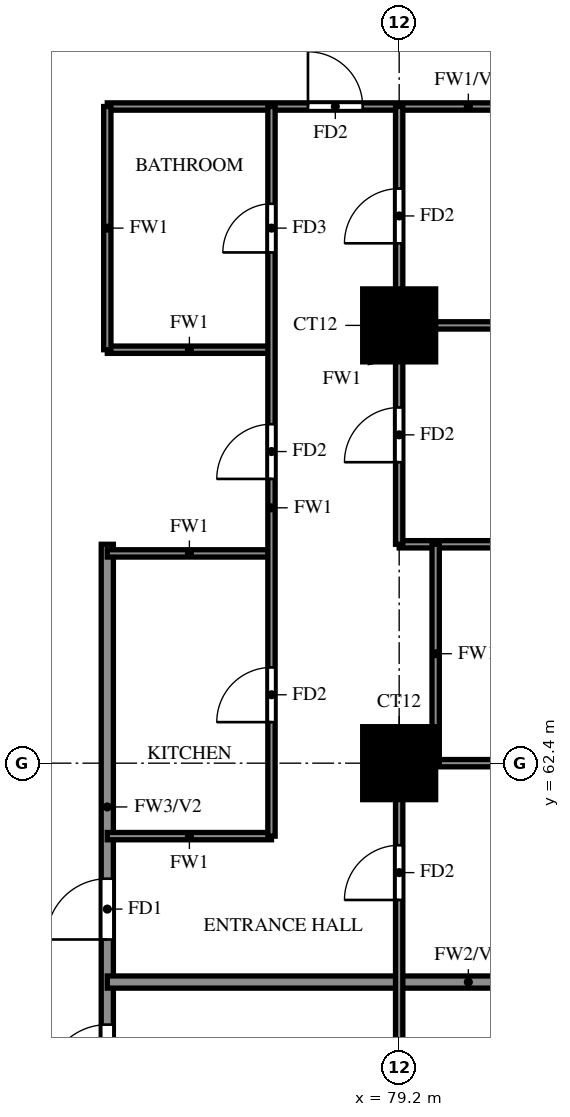
"""IFC4 building model, lengths in metres.
Left out: names, types, materials, properties, quantities, classifications, styles, units other than length and angle.
Written with IfcOpenShell. Run it as: python <this file> out.ifc"""

import sys

from ifc_helpers import new_model, si_unit, direction, frame, frame_2d, origin, origin_2d, place, context, subcontext, project, spatial, rectangle, extrude, source, transform, mapped, element, fill, save


model = new_model("IFC4")
c1 = context("Model", 3, precision=1e-05, world=origin(), true_north=direction((0.0, 1.0)))
c2 = subcontext(c1, "Body", "Model", "MODEL_VIEW")
j1 = project(units=[si_unit("LENGTHUNIT", "METRE"), si_unit("PLANEANGLEUNIT", "RADIAN")], contexts=[c1])
p1 = place(None, origin())
s1 = spatial("IfcSite", under=j1, at=p1, CompositionType="ELEMENT")
p2 = place(p1, origin())
s2 = spatial("IfcBuilding", under=s1, at=p2, CompositionType="ELEMENT")
p3 = place(p2, frame((0.0, 0.0, 93.5)))
s3 = spatial("IfcBuildingStorey", under=s2, at=p3, CompositionType="ELEMENT", Elevation=93.5)
m1 = source(origin(), c2, "Body", "SweptSolid", [
    extrude(rectangle(XDim=1.2, YDim=1.2, at=origin_2d()), origin(), (0.0, 0.0, 1.0), 3.18),
])
for number, where, z_axis, x_axis in (
    (1, (79.2, 62.4, 0.0), (0.0, 0.0, 1.0), (1.0, 0.0, 0.0)),
    (2, (79.2, 69.6, 0.0), (0.0, 0.0, 1.0), (1.0, 0.0, 0.0)),
):
    element("IfcColumn", number, at=place(p3, frame(where, z_axis=z_axis, x_axis=x_axis)), inside=s3, PredefinedType="COLUMN", context=c2, shape_type="MappedRepresentation", body=[
        mapped(m1, transform((0.0, 0.0, 0.0))),
    ])
p4 = place(p3, frame((74.4, 56.4, 0.0), z_axis=(0.0, 0.0, 1.0), x_axis=(0.0, 1.0, 0.0)))
e3 = element("IfcWall", 3, at=p4, inside=s3, PredefinedType="SOLIDWALL", context=c2, shape_type="SweptSolid", body=[
    extrude(rectangle(XDim=9.6, YDim=0.2, at=frame_2d((4.8, 0.0))), origin(), (0.0, 0.0, 1.0), 3.18),
])
p5 = place(p4, frame((0.7, 0.0, 0.0)))
e4 = element("IfcOpeningElement", 4, at=p5, cuts=e3, PredefinedType="OPENING", context=c2, shape_type="SweptSolid", body=[
    extrude(rectangle(XDim=1.0, YDim=2.1, at=frame_2d((0.5, 1.05))), frame((0.0, 0.11, 0.0), z_axis=(0.0, -1.0, 0.0), x_axis=(1.0, 0.0, 0.0)), (0.0, 0.0, 1.0), 0.22),
])
p6 = place(p4, frame((3.1, 0.0, 0.0)))
e5 = element("IfcOpeningElement", 5, at=p6, cuts=e3, PredefinedType="OPENING", context=c2, shape_type="SweptSolid", body=[
    extrude(rectangle(XDim=1.0, YDim=2.1, at=frame_2d((0.5, 1.05))), frame((0.0, 0.11, 0.0), z_axis=(0.0, -1.0, 0.0), x_axis=(1.0, 0.0, 0.0)), (0.0, 0.0, 1.0), 0.22),
])
p7 = place(p3, frame((74.4, 58.8, 0.0), z_axis=(0.0, 0.0, 1.0), x_axis=(1.0, 0.0, 0.0)))
e6 = element("IfcWall", 6, at=p7, inside=s3, PredefinedType="SOLIDWALL", context=c2, shape_type="SweptSolid", body=[
    extrude(rectangle(XDim=11.875, YDim=0.2, at=frame_2d((5.938, 0.0))), origin(), (0.0, 0.0, 1.0), 2.28),
])
p8 = place(p3, frame((74.4, 61.2, 0.0), z_axis=(0.0, 0.0, 1.0), x_axis=(1.0, 0.0, 0.0)))
e7 = element("IfcWall", 7, at=p8, inside=s3, PredefinedType="PARTITIONING", context=c2, shape_type="SweptSolid", body=[
    extrude(rectangle(XDim=2.7, YDim=0.12, at=frame_2d((1.35, 0.0))), origin(), (0.0, 0.0, 1.0), 3.18),
])
p9 = place(p3, frame((79.2, 62.4, 0.0), z_axis=(0.0, 0.0, 1.0), x_axis=(1.0, 0.0, 0.0)))
e8 = element("IfcWall", 8, at=p9, inside=s3, PredefinedType="PARTITIONING", context=c2, shape_type="SweptSolid", body=[
    extrude(rectangle(XDim=7.075, YDim=0.12, at=frame_2d((3.538, 0.0))), origin(), (0.0, 0.0, 1.0), 3.18),
])
p10 = place(p9, frame((3.438, 0.0, 0.0)))
e9 = element("IfcOpeningElement", 9, at=p10, cuts=e8, PredefinedType="OPENING", context=c2, shape_type="SweptSolid", body=[
    extrude(rectangle(XDim=0.8, YDim=2.1, at=frame_2d((0.4, 1.05))), frame((0.0, 0.07, 0.0), z_axis=(0.0, -1.0, 0.0), x_axis=(1.0, 0.0, 0.0)), (0.0, 0.0, 1.0), 0.14),
])
p11 = place(p3, frame((74.4, 65.85, 0.0), z_axis=(0.0, 0.0, 1.0), x_axis=(1.0, 0.0, 0.0)))
e10 = element("IfcWall", 10, at=p11, inside=s3, PredefinedType="PARTITIONING", context=c2, shape_type="SweptSolid", body=[
    extrude(rectangle(XDim=2.7, YDim=0.12, at=frame_2d((1.35, 0.0))), origin(), (0.0, 0.0, 1.0), 3.18),
])
p12 = place(p3, frame((79.2, 66.0, 0.0), z_axis=(0.0, 0.0, 1.0), x_axis=(1.0, 0.0, 0.0)))
e11 = element("IfcWall", 11, at=p12, inside=s3, PredefinedType="PARTITIONING", context=c2, shape_type="SweptSolid", body=[
    extrude(rectangle(XDim=7.075, YDim=0.12, at=frame_2d((3.538, 0.0))), origin(), (0.0, 0.0, 1.0), 2.28),
])
p13 = place(p3, frame((74.4, 69.2, 0.0), z_axis=(0.0, 0.0, 1.0), x_axis=(1.0, 0.0, 0.0)))
e12 = element("IfcWall", 12, at=p13, inside=s3, PredefinedType="PARTITIONING", context=c2, shape_type="SweptSolid", body=[
    extrude(rectangle(XDim=2.7, YDim=0.12, at=frame_2d((1.35, 0.0))), origin(), (0.0, 0.0, 1.0), 3.18),
])
p14 = place(p3, frame((79.2, 69.6, 0.0), z_axis=(0.0, 0.0, 1.0), x_axis=(1.0, 0.0, 0.0)))
e13 = element("IfcWall", 13, at=p14, inside=s3, PredefinedType="PARTITIONING", context=c2, shape_type="SweptSolid", body=[
    extrude(rectangle(XDim=7.075, YDim=0.12, at=frame_2d((3.538, 0.0))), origin(), (0.0, 0.0, 1.0), 3.18),
])
p15 = place(p3, frame((74.4, 73.2, 0.0), z_axis=(0.0, 0.0, 1.0), x_axis=(1.0, 0.0, 0.0)))
e14 = element("IfcWall", 14, at=p15, inside=s3, PredefinedType="PARTITIONING", context=c2, shape_type="SweptSolid", body=[
    extrude(rectangle(XDim=11.875, YDim=0.12, at=frame_2d((5.938, 0.0))), origin(), (0.0, 0.0, 1.0), 2.28),
])
p16 = place(p15, frame((3.3, 0.0, 0.0)))
e15 = element("IfcOpeningElement", 15, at=p16, cuts=e14, PredefinedType="OPENING", context=c2, shape_type="SweptSolid", body=[
    extrude(rectangle(XDim=0.9, YDim=2.1, at=frame_2d((0.45, 1.05))), frame((0.0, 0.07, 0.0), z_axis=(0.0, -1.0, 0.0), x_axis=(1.0, 0.0, 0.0)), (0.0, 0.0, 1.0), 0.14),
])
p17 = place(p3, frame((74.4, 69.2, 0.0), z_axis=(0.0, 0.0, 1.0), x_axis=(0.0, 1.0, 0.0)))
e16 = element("IfcWall", 16, at=p17, inside=s3, PredefinedType="PARTITIONING", context=c2, shape_type="SweptSolid", body=[
    extrude(rectangle(XDim=4.0, YDim=0.12, at=frame_2d((2.0, 0.0))), origin(), (0.0, 0.0, 1.0), 3.18),
])
p18 = place(p3, frame((77.1, 61.2, 0.0), z_axis=(0.0, 0.0, 1.0), x_axis=(0.0, 1.0, 0.0)))
e17 = element("IfcWall", 17, at=p18, inside=s3, PredefinedType="PARTITIONING", context=c2, shape_type="SweptSolid", body=[
    extrude(rectangle(XDim=12.0, YDim=0.12, at=frame_2d((6.0, 0.0))), origin(), (0.0, 0.0, 1.0), 3.18),
])
p19 = place(p18, frame((1.875, 0.0, 0.0)))
e18 = element("IfcOpeningElement", 18, at=p19, cuts=e17, PredefinedType="OPENING", context=c2, shape_type="SweptSolid", body=[
    extrude(rectangle(XDim=0.9, YDim=2.1, at=frame_2d((0.45, 1.05))), frame((0.0, 0.07, 0.0), z_axis=(0.0, -1.0, 0.0), x_axis=(1.0, 0.0, 0.0)), (0.0, 0.0, 1.0), 0.14),
])
p20 = place(p18, frame((5.875, 0.0, 0.0)))
e19 = element("IfcOpeningElement", 19, at=p20, cuts=e17, PredefinedType="OPENING", context=c2, shape_type="SweptSolid", body=[
    extrude(rectangle(XDim=0.9, YDim=2.1, at=frame_2d((0.45, 1.05))), frame((0.0, 0.07, 0.0), z_axis=(0.0, -1.0, 0.0), x_axis=(1.0, 0.0, 0.0)), (0.0, 0.0, 1.0), 0.14),
])
p21 = place(p18, frame((9.6, 0.0, 0.0)))
e20 = element("IfcOpeningElement", 20, at=p21, cuts=e17, PredefinedType="OPENING", context=c2, shape_type="SweptSolid", body=[
    extrude(rectangle(XDim=0.8, YDim=2.1, at=frame_2d((0.4, 1.05))), frame((0.0, 0.07, 0.0), z_axis=(0.0, -1.0, 0.0), x_axis=(1.0, 0.0, 0.0)), (0.0, 0.0, 1.0), 0.14),
])
p22 = place(p3, frame((79.2, 48.125, 0.0), z_axis=(0.0, 0.0, 1.0), x_axis=(0.0, 1.0, 0.0)))
e21 = element("IfcWall", 21, at=p22, inside=s3, PredefinedType="PARTITIONING", context=c2, shape_type="SweptSolid", body=[
    extrude(rectangle(XDim=14.275, YDim=0.12, at=frame_2d((7.137, 0.0))), origin(), (0.0, 0.0, 1.0), 3.18),
])
p23 = place(p22, frame((1.288, 0.0, 0.0)))
e22 = element("IfcOpeningElement", 22, at=p23, cuts=e21, PredefinedType="OPENING", context=c2, shape_type="SweptSolid", body=[
    extrude(rectangle(XDim=0.9, YDim=2.1, at=frame_2d((0.45, 1.05))), frame((0.0, 0.07, 0.0), z_axis=(0.0, -1.0, 0.0), x_axis=(1.0, 0.0, 0.0)), (0.0, 0.0, 1.0), 0.14),
])
p24 = place(p22, frame((7.825, 0.0, 0.0)))
e23 = element("IfcOpeningElement", 23, at=p24, cuts=e21, PredefinedType="OPENING", context=c2, shape_type="SweptSolid", body=[
    extrude(rectangle(XDim=1.5, YDim=2.1, at=frame_2d((0.75, 1.05))), frame((0.0, 0.07, 0.0), z_axis=(0.0, -1.0, 0.0), x_axis=(1.0, 0.0, 0.0)), (0.0, 0.0, 1.0), 0.14),
])
p25 = place(p22, frame((12.025, 0.0, 0.0)))
e24 = element("IfcOpeningElement", 24, at=p25, cuts=e21, PredefinedType="OPENING", context=c2, shape_type="SweptSolid", body=[
    extrude(rectangle(XDim=0.9, YDim=2.1, at=frame_2d((0.45, 1.05))), frame((0.0, 0.07, 0.0), z_axis=(0.0, -1.0, 0.0), x_axis=(1.0, 0.0, 0.0)), (0.0, 0.0, 1.0), 0.14),
])
p26 = place(p3, frame((79.2, 66.0, 0.0), z_axis=(0.0, 0.0, 1.0), x_axis=(0.0, 1.0, 0.0)))
e25 = element("IfcWall", 25, at=p26, inside=s3, PredefinedType="PARTITIONING", context=c2, shape_type="SweptSolid", body=[
    extrude(rectangle(XDim=7.2, YDim=0.12, at=frame_2d((3.6, 0.0))), origin(), (0.0, 0.0, 1.0), 3.18),
])
p27 = place(p26, frame((1.35, 0.0, 0.0)))
e26 = element("IfcOpeningElement", 26, at=p27, cuts=e25, PredefinedType="OPENING", context=c2, shape_type="SweptSolid", body=[
    extrude(rectangle(XDim=0.9, YDim=2.1, at=frame_2d((0.45, 1.05))), frame((0.0, 0.07, 0.0), z_axis=(0.0, -1.0, 0.0), x_axis=(1.0, 0.0, 0.0)), (0.0, 0.0, 1.0), 0.14),
])
p28 = place(p26, frame((4.95, 0.0, 0.0)))
e27 = element("IfcOpeningElement", 27, at=p28, cuts=e25, PredefinedType="OPENING", context=c2, shape_type="SweptSolid", body=[
    extrude(rectangle(XDim=0.9, YDim=2.1, at=frame_2d((0.45, 1.05))), frame((0.0, 0.07, 0.0), z_axis=(0.0, -1.0, 0.0), x_axis=(1.0, 0.0, 0.0)), (0.0, 0.0, 1.0), 0.14),
])
p29 = place(p3, frame((79.8, 62.4, 0.0), z_axis=(0.0, 0.0, 1.0), x_axis=(0.0, 1.0, 0.0)))
e28 = element("IfcWall", 28, at=p29, inside=s3, PredefinedType="PARTITIONING", context=c2, shape_type="SweptSolid", body=[
    extrude(rectangle(XDim=3.6, YDim=0.12, at=frame_2d((1.8, 0.0))), origin(), (0.0, 0.0, 1.0), 3.18),
])
p30 = place(p5, origin())
e29 = element("IfcDoor", 29, at=p30, inside=s3, OperationType="SINGLE_SWING_LEFT", PredefinedType="DOOR", context=c2, shape_type="SweptSolid", body=[
    extrude(rectangle(XDim=1.0, YDim=2.1, at=frame_2d((0.5, 1.05))), frame((0.0, 0.025, 0.0), z_axis=(0.0, -1.0, 0.0), x_axis=(1.0, 0.0, 0.0)), (0.0, 0.0, 1.0), 0.05),
])
fill(e4, e29)
p31 = place(p6, origin())
e30 = element("IfcDoor", 30, at=p31, inside=s3, OperationType="SINGLE_SWING_LEFT", PredefinedType="DOOR", context=c2, shape_type="SweptSolid", body=[
    extrude(rectangle(XDim=1.0, YDim=2.1, at=frame_2d((0.5, 1.05))), frame((0.0, 0.025, 0.0), z_axis=(0.0, -1.0, 0.0), x_axis=(1.0, 0.0, 0.0)), (0.0, 0.0, 1.0), 0.05),
])
fill(e5, e30)
p32 = place(p25, origin())
e31 = element("IfcDoor", 31, at=p32, inside=s3, OperationType="SINGLE_SWING_LEFT", PredefinedType="DOOR", context=c2, shape_type="SweptSolid", body=[
    extrude(rectangle(XDim=0.9, YDim=2.1, at=frame_2d((0.45, 1.05))), frame((0.0, 0.025, 0.0), z_axis=(0.0, -1.0, 0.0), x_axis=(1.0, 0.0, 0.0)), (0.0, 0.0, 1.0), 0.05),
])
fill(e24, e31)
p33 = place(p27, origin())
e32 = element("IfcDoor", 32, at=p33, inside=s3, OperationType="SINGLE_SWING_LEFT", PredefinedType="DOOR", context=c2, shape_type="SweptSolid", body=[
    extrude(rectangle(XDim=0.9, YDim=2.1, at=frame_2d((0.45, 1.05))), frame((0.0, 0.025, 0.0), z_axis=(0.0, -1.0, 0.0), x_axis=(1.0, 0.0, 0.0)), (0.0, 0.0, 1.0), 0.05),
])
fill(e26, e32)
p34 = place(p28, origin())
e33 = element("IfcDoor", 33, at=p34, inside=s3, OperationType="SINGLE_SWING_LEFT", PredefinedType="DOOR", context=c2, shape_type="SweptSolid", body=[
    extrude(rectangle(XDim=0.9, YDim=2.1, at=frame_2d((0.45, 1.05))), frame((0.0, 0.025, 0.0), z_axis=(0.0, -1.0, 0.0), x_axis=(1.0, 0.0, 0.0)), (0.0, 0.0, 1.0), 0.05),
])
fill(e27, e33)
p35 = place(p16, origin())
e34 = element("IfcDoor", 34, at=p35, inside=s3, OperationType="SINGLE_SWING_RIGHT", PredefinedType="DOOR", context=c2, shape_type="SweptSolid", body=[
    extrude(rectangle(XDim=0.9, YDim=2.1, at=frame_2d((0.45, 1.05))), frame((0.0, 0.025, 0.0), z_axis=(0.0, -1.0, 0.0), x_axis=(1.0, 0.0, 0.0)), (0.0, 0.0, 1.0), 0.05),
])
fill(e15, e34)
p36 = place(p19, origin())
e35 = element("IfcDoor", 35, at=p36, inside=s3, OperationType="SINGLE_SWING_LEFT", PredefinedType="DOOR", context=c2, shape_type="SweptSolid", body=[
    extrude(rectangle(XDim=0.9, YDim=2.1, at=frame_2d((0.45, 1.05))), frame((0.0, 0.025, 0.0), z_axis=(0.0, -1.0, 0.0), x_axis=(1.0, 0.0, 0.0)), (0.0, 0.0, 1.0), 0.05),
])
fill(e18, e35)
p37 = place(p20, origin())
e36 = element("IfcDoor", 36, at=p37, inside=s3, OperationType="SINGLE_SWING_LEFT", PredefinedType="DOOR", context=c2, shape_type="SweptSolid", body=[
    extrude(rectangle(XDim=0.9, YDim=2.1, at=frame_2d((0.45, 1.05))), frame((0.0, 0.025, 0.0), z_axis=(0.0, -1.0, 0.0), x_axis=(1.0, 0.0, 0.0)), (0.0, 0.0, 1.0), 0.05),
])
fill(e19, e36)
p38 = place(p21, origin())
e37 = element("IfcDoor", 37, at=p38, inside=s3, OperationType="SINGLE_SWING_RIGHT", PredefinedType="DOOR", context=c2, shape_type="SweptSolid", body=[
    extrude(rectangle(XDim=0.8, YDim=2.1, at=frame_2d((0.4, 1.05))), frame((0.0, 0.025, 0.0), z_axis=(0.0, -1.0, 0.0), x_axis=(1.0, 0.0, 0.0)), (0.0, 0.0, 1.0), 0.05),
])
fill(e20, e37)
save(model, sys.argv[1])
